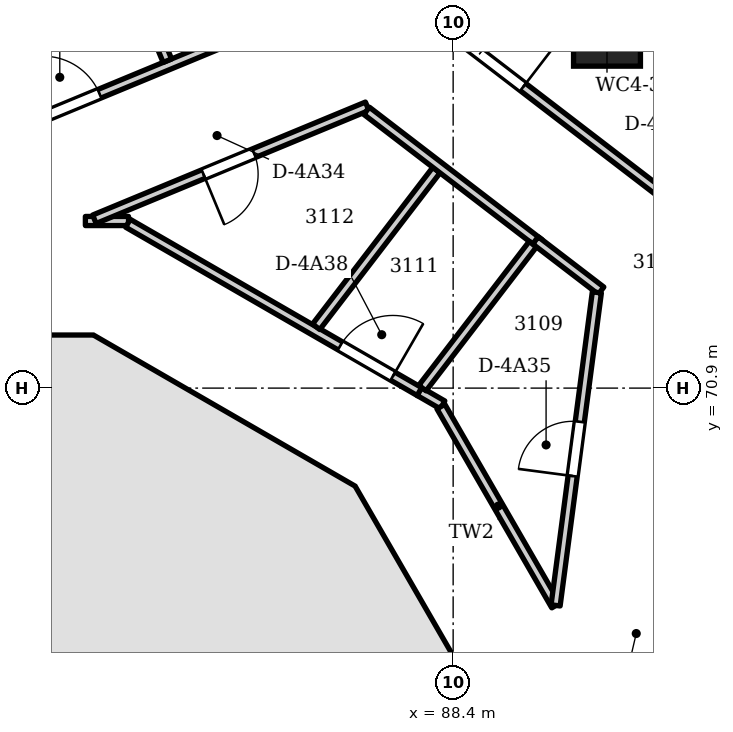
"""IFC4 building model, lengths in metres.
Left out: names, types, materials, properties, quantities, classifications, styles, units other than length and angle.
Written with IfcOpenShell. Run it as: python <this file> out.ifc"""

import sys

from ifc_helpers import new_model, si_unit, direction, frame, frame_2d, origin, origin_2d, place, context, subcontext, project, spatial, polyline, rectangle, circle, outline, extrude, element, fill, save


model = new_model("IFC4")
c1 = context("Model", 3, precision=1e-05, world=origin(), true_north=direction((0.0, 1.0)))
c2 = subcontext(c1, "Body", "Model", "MODEL_VIEW")
j1 = project(units=[si_unit("LENGTHUNIT", "METRE"), si_unit("PLANEANGLEUNIT", "RADIAN")], contexts=[c1])
p1 = place(None, origin())
s1 = spatial("IfcSite", under=j1, at=p1, CompositionType="ELEMENT")
p2 = place(p1, origin())
s2 = spatial("IfcBuilding", under=s1, at=p2, CompositionType="ELEMENT")
p3 = place(p2, frame((0.0, 0.0, 124.2)))
s3 = spatial("IfcBuildingStorey", under=s2, at=p3, CompositionType="ELEMENT", Elevation=124.2)
p4 = place(p3, frame((88.883, 64.76, 0.0), z_axis=(0.0, 0.0, 1.0), x_axis=(-0.500038571144, 0.866003133579, 0.0)))
e1 = element("IfcWall", 1, at=p4, inside=s3, PredefinedType="SHEAR", context=c2, shape_type="SweptSolid", body=[
    extrude(outline(polyline([(0.0, -0.45), (4.969, -0.45), (4.728, 0.45), (0.241, 0.45), (0.0, -0.45)])), origin(), (0.0, 0.0, 1.0), 3.6),
])
p5 = place(p4, frame((1.885, 0.0, 0.0)))
e2 = element("IfcOpeningElement", 2, at=p5, cuts=e1, PredefinedType="OPENING", context=c2, shape_type="SweptSolid", body=[
    extrude(rectangle(XDim=1.2, YDim=2.1, at=frame_2d((0.6, 1.05))), frame((0.0, 0.46, 0.0), z_axis=(0.0, -1.0, 0.0), x_axis=(1.0, 0.0, 0.0)), (0.0, 0.0, 1.0), 0.92),
])
p6 = place(p3, frame((86.563, 68.898, 0.0), z_axis=(0.0, 0.0, 1.0), x_axis=(-0.866003133579, 0.500038571144, 0.0)))
e3 = element("IfcWall", 3, at=p6, inside=s3, PredefinedType="SHEAR", context=c2, shape_type="SweptSolid", body=[
    extrude(outline(polyline([(0.0, -0.45), (4.969, -0.45), (4.728, 0.45), (0.241, 0.45), (0.0, -0.45)])), origin(), (0.0, 0.0, 1.0), 3.6),
])
p7 = place(p6, frame((1.496, 0.0, 0.0)))
e4 = element("IfcOpeningElement", 4, at=p7, cuts=e3, PredefinedType="OPENING", context=c2, shape_type="SweptSolid", body=[
    extrude(rectangle(XDim=0.9, YDim=2.1, at=frame_2d((0.45, 1.05))), frame((0.0, 0.46, 0.0), z_axis=(0.0, -1.0, 0.0), x_axis=(1.0, 0.0, 0.0)), (0.0, 0.0, 1.0), 0.92),
])
p8 = place(p3, frame((82.485, 71.323, 0.0), z_axis=(0.0, 0.0, 1.0), x_axis=(-1.0, 0.0, 0.0)))
e5 = element("IfcWall", 5, at=p8, inside=s3, PredefinedType="SHEAR", context=c2, shape_type="SweptSolid", body=[
    extrude(outline(polyline([(0.0, -0.45), (4.969, -0.45), (4.728, 0.45), (0.241, 0.45), (0.0, -0.45)])), origin(), (0.0, 0.0, 1.0), 3.6),
])
p9 = place(p8, frame((1.785, 0.0, 0.0)))
e6 = element("IfcOpeningElement", 6, at=p9, cuts=e5, PredefinedType="OPENING", context=c2, shape_type="SweptSolid", body=[
    extrude(rectangle(XDim=1.4, YDim=2.1, at=frame_2d((0.7, 1.05))), frame((0.0, 0.46, 0.0), z_axis=(0.0, -1.0, 0.0), x_axis=(1.0, 0.0, 0.0)), (0.0, 0.0, 1.0), 0.92),
])
p10 = place(p3, frame((82.269, 65.369, 0.0), z_axis=(0.0, 0.0, 1.0), x_axis=(0.865983655544, 0.500072303102, 0.0)))
e7 = element("IfcWall", 7, at=p10, inside=s3, PredefinedType="SHEAR", context=c2, shape_type="SweptSolid", body=[
    extrude(rectangle(XDim=4.973, YDim=0.3, at=frame_2d((2.487, 0.0))), origin(), (0.0, 0.0, 1.0), 3.6),
])
p11 = place(p10, frame((1.351, 0.0, 0.0)))
e8 = element("IfcOpeningElement", 8, at=p11, cuts=e7, PredefinedType="OPENING", context=c2, shape_type="SweptSolid", body=[
    extrude(rectangle(XDim=1.0, YDim=2.1, at=frame_2d((0.5, 1.05))), frame((0.0, 0.16, 0.0), z_axis=(0.0, -1.0, 0.0), x_axis=(1.0, 0.0, 0.0)), (0.0, 0.0, 1.0), 0.32),
])
p12 = place(p3, frame((90.93, 76.744, -0.35), z_axis=(0.0, 0.0, 1.0), x_axis=(1.0, 0.0, 0.0)))
e9 = element("IfcColumn", 9, at=p12, inside=s3, PredefinedType="COLUMN", context=c2, shape_type="SweptSolid", body=[
    extrude(circle(Radius=0.55, at=origin_2d()), origin(), (0.0, 0.0, 1.0), 3.95),
])
p13 = place(p3, frame((52.387, 70.1, 0.0), z_axis=(0.0, 0.0, 1.0), x_axis=(0.92388051416, 0.382681062447, 0.0)))
e10 = element("IfcWall", 10, at=p13, inside=s3, PredefinedType="SOLIDWALL", context=c2, shape_type="SweptSolid", body=[
    extrude(outline(polyline([(0.149, 0.075), (0.149, -0.075), (45.057, -0.075), (45.057, 0.075), (0.149, 0.075)])), origin(), (0.0, 0.0, 1.0), 3.3),
])
p14 = place(p13, frame((1.239, 0.0, 0.0)))
e11 = element("IfcOpeningElement", 11, at=p14, cuts=e10, PredefinedType="OPENING", context=c2, shape_type="SweptSolid", body=[
    extrude(rectangle(XDim=1.8, YDim=2.6, at=frame_2d((0.9, 1.3))), frame((0.0, 0.085, 0.0), z_axis=(0.0, -1.0, 0.0), x_axis=(1.0, 0.0, 0.0)), (0.0, 0.0, 1.0), 0.17),
])
p15 = place(p13, frame((4.316, 0.0, 0.0)))
e12 = element("IfcOpeningElement", 12, at=p15, cuts=e10, PredefinedType="OPENING", context=c2, shape_type="SweptSolid", body=[
    extrude(rectangle(XDim=1.8, YDim=2.6, at=frame_2d((0.9, 1.3))), frame((0.0, 0.085, 0.0), z_axis=(0.0, -1.0, 0.0), x_axis=(1.0, 0.0, 0.0)), (0.0, 0.0, 1.0), 0.17),
])
p16 = place(p13, frame((7.793, 0.0, 0.0)))
e13 = element("IfcOpeningElement", 13, at=p16, cuts=e10, PredefinedType="OPENING", context=c2, shape_type="SweptSolid", body=[
    extrude(rectangle(XDim=1.8, YDim=2.6, at=frame_2d((0.9, 1.3))), frame((0.0, 0.085, 0.0), z_axis=(0.0, -1.0, 0.0), x_axis=(1.0, 0.0, 0.0)), (0.0, 0.0, 1.0), 0.17),
])
p17 = place(p13, frame((11.271, 0.0, 0.0)))
e14 = element("IfcOpeningElement", 14, at=p17, cuts=e10, PredefinedType="OPENING", context=c2, shape_type="SweptSolid", body=[
    extrude(rectangle(XDim=1.8, YDim=2.6, at=frame_2d((0.9, 1.3))), frame((0.0, 0.085, 0.0), z_axis=(0.0, -1.0, 0.0), x_axis=(1.0, 0.0, 0.0)), (0.0, 0.0, 1.0), 0.17),
])
p18 = place(p13, frame((14.748, 0.0, 0.0)))
e15 = element("IfcOpeningElement", 15, at=p18, cuts=e10, PredefinedType="OPENING", context=c2, shape_type="SweptSolid", body=[
    extrude(rectangle(XDim=1.8, YDim=2.6, at=frame_2d((0.9, 1.3))), frame((0.0, 0.085, 0.0), z_axis=(0.0, -1.0, 0.0), x_axis=(1.0, 0.0, 0.0)), (0.0, 0.0, 1.0), 0.17),
])
p19 = place(p13, frame((18.226, 0.0, 0.0)))
e16 = element("IfcOpeningElement", 16, at=p19, cuts=e10, PredefinedType="OPENING", context=c2, shape_type="SweptSolid", body=[
    extrude(rectangle(XDim=1.8, YDim=2.6, at=frame_2d((0.9, 1.3))), frame((0.0, 0.085, 0.0), z_axis=(0.0, -1.0, 0.0), x_axis=(1.0, 0.0, 0.0)), (0.0, 0.0, 1.0), 0.17),
])
p20 = place(p13, frame((21.703, 0.0, 0.0)))
e17 = element("IfcOpeningElement", 17, at=p20, cuts=e10, PredefinedType="OPENING", context=c2, shape_type="SweptSolid", body=[
    extrude(rectangle(XDim=1.8, YDim=2.6, at=frame_2d((0.9, 1.3))), frame((0.0, 0.085, 0.0), z_axis=(0.0, -1.0, 0.0), x_axis=(1.0, 0.0, 0.0)), (0.0, 0.0, 1.0), 0.17),
])
p21 = place(p13, frame((25.18, 0.0, 0.0)))
e18 = element("IfcOpeningElement", 18, at=p21, cuts=e10, PredefinedType="OPENING", context=c2, shape_type="SweptSolid", body=[
    extrude(rectangle(XDim=1.8, YDim=2.6, at=frame_2d((0.9, 1.3))), frame((0.0, 0.085, 0.0), z_axis=(0.0, -1.0, 0.0), x_axis=(1.0, 0.0, 0.0)), (0.0, 0.0, 1.0), 0.17),
])
p22 = place(p13, frame((28.658, 0.0, 0.0)))
e19 = element("IfcOpeningElement", 19, at=p22, cuts=e10, PredefinedType="OPENING", context=c2, shape_type="SweptSolid", body=[
    extrude(rectangle(XDim=1.8, YDim=2.6, at=frame_2d((0.9, 1.3))), frame((0.0, 0.085, 0.0), z_axis=(0.0, -1.0, 0.0), x_axis=(1.0, 0.0, 0.0)), (0.0, 0.0, 1.0), 0.17),
])
p23 = place(p13, frame((32.135, 0.0, 0.0)))
e20 = element("IfcOpeningElement", 20, at=p23, cuts=e10, PredefinedType="OPENING", context=c2, shape_type="SweptSolid", body=[
    extrude(rectangle(XDim=1.8, YDim=2.6, at=frame_2d((0.9, 1.3))), frame((0.0, 0.085, 0.0), z_axis=(0.0, -1.0, 0.0), x_axis=(1.0, 0.0, 0.0)), (0.0, 0.0, 1.0), 0.17),
])
p24 = place(p13, frame((35.613, 0.0, 0.0)))
e21 = element("IfcOpeningElement", 21, at=p24, cuts=e10, PredefinedType="OPENING", context=c2, shape_type="SweptSolid", body=[
    extrude(rectangle(XDim=1.8, YDim=2.6, at=frame_2d((0.9, 1.3))), frame((0.0, 0.085, 0.0), z_axis=(0.0, -1.0, 0.0), x_axis=(1.0, 0.0, 0.0)), (0.0, 0.0, 1.0), 0.17),
])
p25 = place(p13, frame((39.09, 0.0, 0.0)))
e22 = element("IfcOpeningElement", 22, at=p25, cuts=e10, PredefinedType="OPENING", context=c2, shape_type="SweptSolid", body=[
    extrude(rectangle(XDim=1.8, YDim=2.6, at=frame_2d((0.9, 1.3))), frame((0.0, 0.085, 0.0), z_axis=(0.0, -1.0, 0.0), x_axis=(1.0, 0.0, 0.0)), (0.0, 0.0, 1.0), 0.17),
])
p26 = place(p13, frame((42.167, 0.0, 0.0)))
e23 = element("IfcOpeningElement", 23, at=p26, cuts=e10, PredefinedType="OPENING", context=c2, shape_type="SweptSolid", body=[
    extrude(rectangle(XDim=1.8, YDim=2.6, at=frame_2d((0.9, 1.3))), frame((0.0, 0.085, 0.0), z_axis=(0.0, -1.0, 0.0), x_axis=(1.0, 0.0, 0.0)), (0.0, 0.0, 1.0), 0.17),
])
p27 = place(p3, frame((77.532, 73.648, 0.0), z_axis=(0.0, 0.0, 1.0), x_axis=(0.923863379582, 0.382722426659, 0.0)))
e24 = element("IfcWall", 24, at=p27, inside=s3, PredefinedType="PARTITIONING", context=c2, shape_type="SweptSolid", body=[
    extrude(rectangle(XDim=12.139, YDim=0.15, at=frame_2d((6.07, 0.0))), origin(), (0.0, 0.0, 1.0), 3.3),
])
p28 = place(p27, frame((1.116, 0.0, 0.0)))
e25 = element("IfcOpeningElement", 25, at=p28, cuts=e24, PredefinedType="OPENING", context=c2, shape_type="SweptSolid", body=[
    extrude(rectangle(XDim=1.0, YDim=2.1, at=frame_2d((0.5, 1.05))), frame((0.0, 0.085, 0.0), z_axis=(0.0, -1.0, 0.0), x_axis=(1.0, 0.0, 0.0)), (0.0, 0.0, 1.0), 0.17),
])
p29 = place(p27, frame((4.469, 0.0, 0.0)))
e26 = element("IfcOpeningElement", 26, at=p29, cuts=e24, PredefinedType="OPENING", context=c2, shape_type="SweptSolid", body=[
    extrude(rectangle(XDim=1.0, YDim=2.1, at=frame_2d((0.5, 1.05))), frame((0.0, 0.085, 0.0), z_axis=(0.0, -1.0, 0.0), x_axis=(1.0, 0.0, 0.0)), (0.0, 0.0, 1.0), 0.17),
])
p30 = place(p27, frame((7.947, 0.0, 0.0)))
e27 = element("IfcOpeningElement", 27, at=p30, cuts=e24, PredefinedType="OPENING", context=c2, shape_type="SweptSolid", body=[
    extrude(rectangle(XDim=1.0, YDim=2.1, at=frame_2d((0.5, 1.05))), frame((0.0, 0.085, 0.0), z_axis=(0.0, -1.0, 0.0), x_axis=(1.0, 0.0, 0.0)), (0.0, 0.0, 1.0), 0.17),
])
p31 = place(p3, frame((81.329, 82.007, 0.0), z_axis=(0.0, 0.0, 1.0), x_axis=(0.382731197273, -0.923859746192, 0.0)))
e28 = element("IfcWall", 28, at=p31, inside=s3, PredefinedType="PARTITIONING", context=c2, shape_type="SweptSolid", body=[
    extrude(rectangle(XDim=6.195, YDim=0.15, at=frame_2d((3.097, 0.0))), origin(), (0.0, 0.0, 1.0), 3.3),
])
p32 = place(p3, frame((82.352, 73.648, 0.0), z_axis=(0.0, 0.0, 1.0), x_axis=(1.0, 0.0, 0.0)))
e29 = element("IfcWall", 29, at=p32, inside=s3, PredefinedType="PARTITIONING", context=c2, shape_type="SweptSolid", body=[
    extrude(rectangle(XDim=0.71, YDim=0.15, at=frame_2d((0.355, 0.0))), origin(), (0.0, 0.0, 1.0), 3.3),
])
p33 = place(p3, frame((82.5, 73.677, 0.0), z_axis=(0.0, 0.0, 1.0), x_axis=(0.923900404771, 0.382633038384, 0.0)))
e30 = element("IfcWall", 30, at=p33, inside=s3, PredefinedType="PARTITIONING", context=c2, shape_type="SweptSolid", body=[
    extrude(rectangle(XDim=4.856, YDim=0.15, at=frame_2d((2.428, 0.0))), origin(), (0.0, 0.0, 1.0), 3.3),
])
p34 = place(p33, frame((1.94, 0.0, 0.0)))
e31 = element("IfcOpeningElement", 31, at=p34, cuts=e30, PredefinedType="OPENING", context=c2, shape_type="SweptSolid", body=[
    extrude(rectangle(XDim=0.9, YDim=2.1, at=frame_2d((0.45, 1.05))), frame((0.0, 0.085, 0.0), z_axis=(0.0, -1.0, 0.0), x_axis=(1.0, 0.0, 0.0)), (0.0, 0.0, 1.0), 0.17),
])
p35 = place(p3, frame((83.052, 73.611, 0.0), z_axis=(0.0, 0.0, 1.0), x_axis=(0.866011740381, -0.500023664962, 0.0)))
e32 = element("IfcWall", 32, at=p35, inside=s3, PredefinedType="PARTITIONING", context=c2, shape_type="SweptSolid", body=[
    extrude(rectangle(XDim=5.543, YDim=0.15, at=frame_2d((2.771, 0.0))), origin(), (0.0, 0.0, 1.0), 2.7),
])
p36 = place(p35, frame((4.031, 0.0, 0.0)))
e33 = element("IfcOpeningElement", 33, at=p36, cuts=e32, PredefinedType="OPENING", context=c2, shape_type="SweptSolid", body=[
    extrude(rectangle(XDim=1.0, YDim=2.1, at=frame_2d((0.5, 1.05))), frame((0.0, 0.085, 0.0), z_axis=(0.0, -1.0, 0.0), x_axis=(1.0, 0.0, 0.0)), (0.0, 0.0, 1.0), 0.17),
])
p37 = place(p3, frame((86.148, 71.908, 0.0), z_axis=(0.0, 0.0, 1.0), x_axis=(0.608765985087, 0.793349844269, 0.0)))
e34 = element("IfcWall", 34, at=p37, inside=s3, PredefinedType="PARTITIONING", context=c2, shape_type="SweptSolid", body=[
    extrude(rectangle(XDim=3.249, YDim=0.15, at=frame_2d((1.624, 0.0))), origin(), (0.0, 0.0, 1.0), 3.3),
])
p38 = place(p3, frame((86.977, 75.46, 0.0), z_axis=(0.0, 0.0, 1.0), x_axis=(0.793436349507, -0.608653234018, 0.0)))
e35 = element("IfcWall", 35, at=p38, inside=s3, PredefinedType="PARTITIONING", context=c2, shape_type="SweptSolid", body=[
    extrude(rectangle(XDim=3.583, YDim=0.15, at=frame_2d((1.792, 0.0))), origin(), (0.0, 0.0, 1.0), 2.7),
])
p39 = place(p3, frame((87.26, 77.607, 0.0), z_axis=(0.0, 0.0, 1.0), x_axis=(0.79336631803, -0.608744515718, 0.0)))
e36 = element("IfcWall", 36, at=p39, inside=s3, PredefinedType="PARTITIONING", context=c2, shape_type="SweptSolid", body=[
    extrude(rectangle(XDim=7.024, YDim=0.15, at=frame_2d((3.512, 0.0))), origin(), (0.0, 0.0, 1.0), 2.7),
])
p40 = place(p39, frame((1.086, 0.0, 0.0)))
e37 = element("IfcOpeningElement", 37, at=p40, cuts=e36, PredefinedType="OPENING", context=c2, shape_type="SweptSolid", body=[
    extrude(rectangle(XDim=1.8, YDim=2.1, at=frame_2d((0.9, 1.05))), frame((0.0, 0.085, 0.0), z_axis=(0.0, -1.0, 0.0), x_axis=(1.0, 0.0, 0.0)), (0.0, 0.0, 1.0), 0.17),
])
p41 = place(p3, frame((87.846, 70.843, 0.0), z_axis=(0.0, 0.0, 1.0), x_axis=(0.86587042983, -0.500268326746, 0.0)))
e38 = element("IfcWall", 38, at=p41, inside=s3, PredefinedType="PARTITIONING", context=c2, shape_type="SweptSolid", body=[
    extrude(rectangle(XDim=0.439, YDim=0.15, at=frame_2d((0.219, 0.0))), origin(), (0.0, 0.0, 1.0), 3.3),
])
p42 = place(p3, frame((87.895, 70.9, 0.0), z_axis=(0.0, 0.0, 1.0), x_axis=(0.608761301523, 0.793353438114, 0.0)))
e39 = element("IfcWall", 39, at=p42, inside=s3, PredefinedType="PARTITIONING", context=c2, shape_type="SweptSolid", body=[
    extrude(rectangle(XDim=2.984, YDim=0.15, at=frame_2d((1.492, 0.0))), origin(), (0.0, 0.0, 1.0), 3.3),
])
p43 = place(p3, frame((88.198, 70.596, 0.0), z_axis=(0.0, 0.0, 1.0), x_axis=(0.499871635049, -0.86609950264, 0.0)))
e40 = element("IfcWall", 40, at=p43, inside=s3, PredefinedType="PARTITIONING", context=c2, shape_type="SweptSolid", body=[
    extrude(rectangle(XDim=3.778, YDim=0.15, at=frame_2d((1.889, 0.0))), origin(), (0.0, 0.0, 1.0), 3.3),
])
p44 = place(p3, frame((89.754, 73.329, 0.0), z_axis=(0.0, 0.0, 1.0), x_axis=(0.793704663206, -0.608303302313, 0.0)))
e41 = element("IfcWall", 41, at=p44, inside=s3, PredefinedType="PARTITIONING", context=c2, shape_type="SweptSolid", body=[
    extrude(rectangle(XDim=1.359, YDim=0.15, at=frame_2d((0.679, 0.0))), origin(), (0.0, 0.0, 1.0), 3.3),
])
p45 = place(p3, frame((90.085, 67.327, 0.0), z_axis=(0.0, 0.0, 1.0), x_axis=(0.130647942506, 0.991428825039, 0.0)))
e42 = element("IfcWall", 42, at=p45, inside=s3, PredefinedType="PARTITIONING", context=c2, shape_type="SweptSolid", body=[
    extrude(rectangle(XDim=5.191, YDim=0.15, at=frame_2d((2.596, 0.0))), origin(), (0.0, 0.0, 1.0), 3.3),
])
p46 = place(p45, frame((2.146, 0.0, 0.0)))
e43 = element("IfcOpeningElement", 43, at=p46, cuts=e42, PredefinedType="OPENING", context=c2, shape_type="SweptSolid", body=[
    extrude(rectangle(XDim=0.9, YDim=2.1, at=frame_2d((0.45, 1.05))), frame((0.0, 0.085, 0.0), z_axis=(0.0, -1.0, 0.0), x_axis=(1.0, 0.0, 0.0)), (0.0, 0.0, 1.0), 0.17),
])
p47 = place(p3, frame((91.374, 62.752, 0.0), z_axis=(0.0, 0.0, 1.0), x_axis=(0.130502976736, 0.991447917474, 0.0)))
e44 = element("IfcWall", 44, at=p47, inside=s3, PredefinedType="PARTITIONING", context=c2, shape_type="SweptSolid", body=[
    extrude(rectangle(XDim=8.34, YDim=0.15, at=frame_2d((4.17, 0.0))), origin(), (0.0, 0.0, 1.0), 3.3),
])
p48 = place(p47, frame((3.632, 0.0, 0.0)))
e45 = element("IfcOpeningElement", 45, at=p48, cuts=e44, PredefinedType="OPENING", context=c2, shape_type="SweptSolid", body=[
    extrude(rectangle(XDim=0.9, YDim=2.1, at=frame_2d((0.45, 1.05))), frame((0.0, 0.085, 0.0), z_axis=(0.0, -1.0, 0.0), x_axis=(1.0, 0.0, 0.0)), (0.0, 0.0, 1.0), 0.17),
])
p49 = place(p47, frame((1.243, 0.0, 0.0)))
e46 = element("IfcOpeningElement", 46, at=p49, cuts=e44, PredefinedType="OPENING", context=c2, shape_type="SweptSolid", body=[
    extrude(rectangle(XDim=1.0, YDim=2.1, at=frame_2d((0.5, 1.05))), frame((0.0, 0.085, 0.0), z_axis=(0.0, -1.0, 0.0), x_axis=(1.0, 0.0, 0.0)), (0.0, 0.0, 1.0), 0.17),
])
p50 = place(p3, frame((81.775, 68.028, 0.0), z_axis=(0.0, 0.0, 1.0), x_axis=(0.866130725101, 0.499817533742, 0.0)))
e47 = element("IfcWall", 47, at=p50, inside=s3, PredefinedType="PARTITIONING", context=c2, shape_type="SweptSolid", body=[
    extrude(rectangle(XDim=2.149, YDim=0.2, at=frame_2d((1.074, 0.0))), origin(), (0.0, 0.0, 1.0), 3.3),
])
p51 = place(p3, frame((82.844, 65.874, 0.0), z_axis=(0.0, 0.0, 1.0), x_axis=(-0.499865770674, 0.866102887253, 0.0)))
e48 = element("IfcWall", 48, at=p51, inside=s3, PredefinedType="PARTITIONING", context=c2, shape_type="SweptSolid", body=[
    extrude(rectangle(XDim=2.064, YDim=0.2, at=frame_2d((1.032, 0.0))), origin(), (0.0, 0.0, 1.0), 3.3),
])
p52 = place(p3, frame((84.749, 66.974, 0.0), z_axis=(0.0, 0.0, 1.0), x_axis=(-0.500136062276, 0.86594683394, 0.0)))
e49 = element("IfcWall", 49, at=p52, inside=s3, PredefinedType="PARTITIONING", context=c2, shape_type="SweptSolid", body=[
    extrude(rectangle(XDim=2.299, YDim=0.2, at=frame_2d((1.149, 0.0))), origin(), (0.0, 0.0, 1.0), 3.3),
])
p53 = place(p40, origin())
e50 = element("IfcDoor", 50, at=p53, inside=s3, OperationType="DOUBLE_DOOR_DOUBLE_SWING", PredefinedType="DOOR", context=c2, shape_type="SweptSolid", body=[
    extrude(rectangle(XDim=1.8, YDim=2.1, at=frame_2d((0.9, 1.05))), frame((0.0, 0.025, 0.0), z_axis=(0.0, -1.0, 0.0), x_axis=(1.0, 0.0, 0.0)), (0.0, 0.0, 1.0), 0.05),
])
fill(e37, e50)
p54 = place(p29, origin())
e51 = element("IfcDoor", 51, at=p54, inside=s3, OperationType="SINGLE_SWING_LEFT", PredefinedType="DOOR", context=c2, shape_type="SweptSolid", body=[
    extrude(rectangle(XDim=1.0, YDim=2.1, at=frame_2d((0.5, 1.05))), frame((0.0, 0.025, 0.0), z_axis=(0.0, -1.0, 0.0), x_axis=(1.0, 0.0, 0.0)), (0.0, 0.0, 1.0), 0.05),
])
fill(e26, e51)
p55 = place(p34, frame((0.9, 0.0, 0.0), z_axis=(0.0, 0.0, 1.0), x_axis=(-1.0, 0.0, 0.0)))
e52 = element("IfcDoor", 52, at=p55, inside=s3, OperationType="SINGLE_SWING_RIGHT", PredefinedType="DOOR", context=c2, shape_type="SweptSolid", body=[
    extrude(rectangle(XDim=0.9, YDim=2.1, at=frame_2d((0.45, 1.05))), frame((0.0, 0.025, 0.0), z_axis=(0.0, -1.0, 0.0), x_axis=(1.0, 0.0, 0.0)), (0.0, 0.0, 1.0), 0.05),
])
fill(e31, e52)
p56 = place(p46, origin())
e53 = element("IfcDoor", 53, at=p56, inside=s3, OperationType="SINGLE_SWING_LEFT", PredefinedType="DOOR", context=c2, shape_type="SweptSolid", body=[
    extrude(rectangle(XDim=0.9, YDim=2.1, at=frame_2d((0.45, 1.05))), frame((0.0, 0.025, 0.0), z_axis=(0.0, -1.0, 0.0), x_axis=(1.0, 0.0, 0.0)), (0.0, 0.0, 1.0), 0.05),
])
fill(e43, e53)
p57 = place(p36, origin())
e54 = element("IfcDoor", 54, at=p57, inside=s3, OperationType="SINGLE_SWING_RIGHT", PredefinedType="DOOR", context=c2, shape_type="SweptSolid", body=[
    extrude(rectangle(XDim=1.0, YDim=2.1, at=frame_2d((0.5, 1.05))), frame((0.0, 0.025, 0.0), z_axis=(0.0, -1.0, 0.0), x_axis=(1.0, 0.0, 0.0)), (0.0, 0.0, 1.0), 0.05),
])
fill(e33, e54)
p58 = place(p5, origin())
e55 = element("IfcDoor", 55, at=p58, inside=s3, OperationType="DOUBLE_DOOR_SINGLE_SWING", PredefinedType="DOOR", context=c2, shape_type="SweptSolid", body=[
    extrude(rectangle(XDim=1.2, YDim=2.1, at=frame_2d((0.6, 1.05))), frame((0.0, 0.025, 0.0), z_axis=(0.0, -1.0, 0.0), x_axis=(1.0, 0.0, 0.0)), (0.0, 0.0, 1.0), 0.05),
])
fill(e2, e55)
p59 = place(p11, origin())
e56 = element("IfcDoor", 56, at=p59, inside=s3, OperationType="DOUBLE_DOOR_SLIDING", PredefinedType="DOOR", context=c2, shape_type="SweptSolid", body=[
    extrude(rectangle(XDim=1.0, YDim=2.1, at=frame_2d((0.5, 1.05))), frame((0.0, 0.025, 0.0), z_axis=(0.0, -1.0, 0.0), x_axis=(1.0, 0.0, 0.0)), (0.0, 0.0, 1.0), 0.05),
])
fill(e8, e56)
p60 = place(p7, origin())
e57 = element("IfcDoor", 57, at=p60, inside=s3, OperationType="SINGLE_SWING_LEFT", PredefinedType="DOOR", context=c2, shape_type="SweptSolid", body=[
    extrude(rectangle(XDim=0.9, YDim=2.1, at=frame_2d((0.45, 1.05))), frame((0.0, 0.175, 0.0), z_axis=(0.0, -1.0, 0.0), x_axis=(1.0, 0.0, 0.0)), (0.0, 0.0, 1.0), 0.05),
])
fill(e4, e57)
save(model, sys.argv[1])
